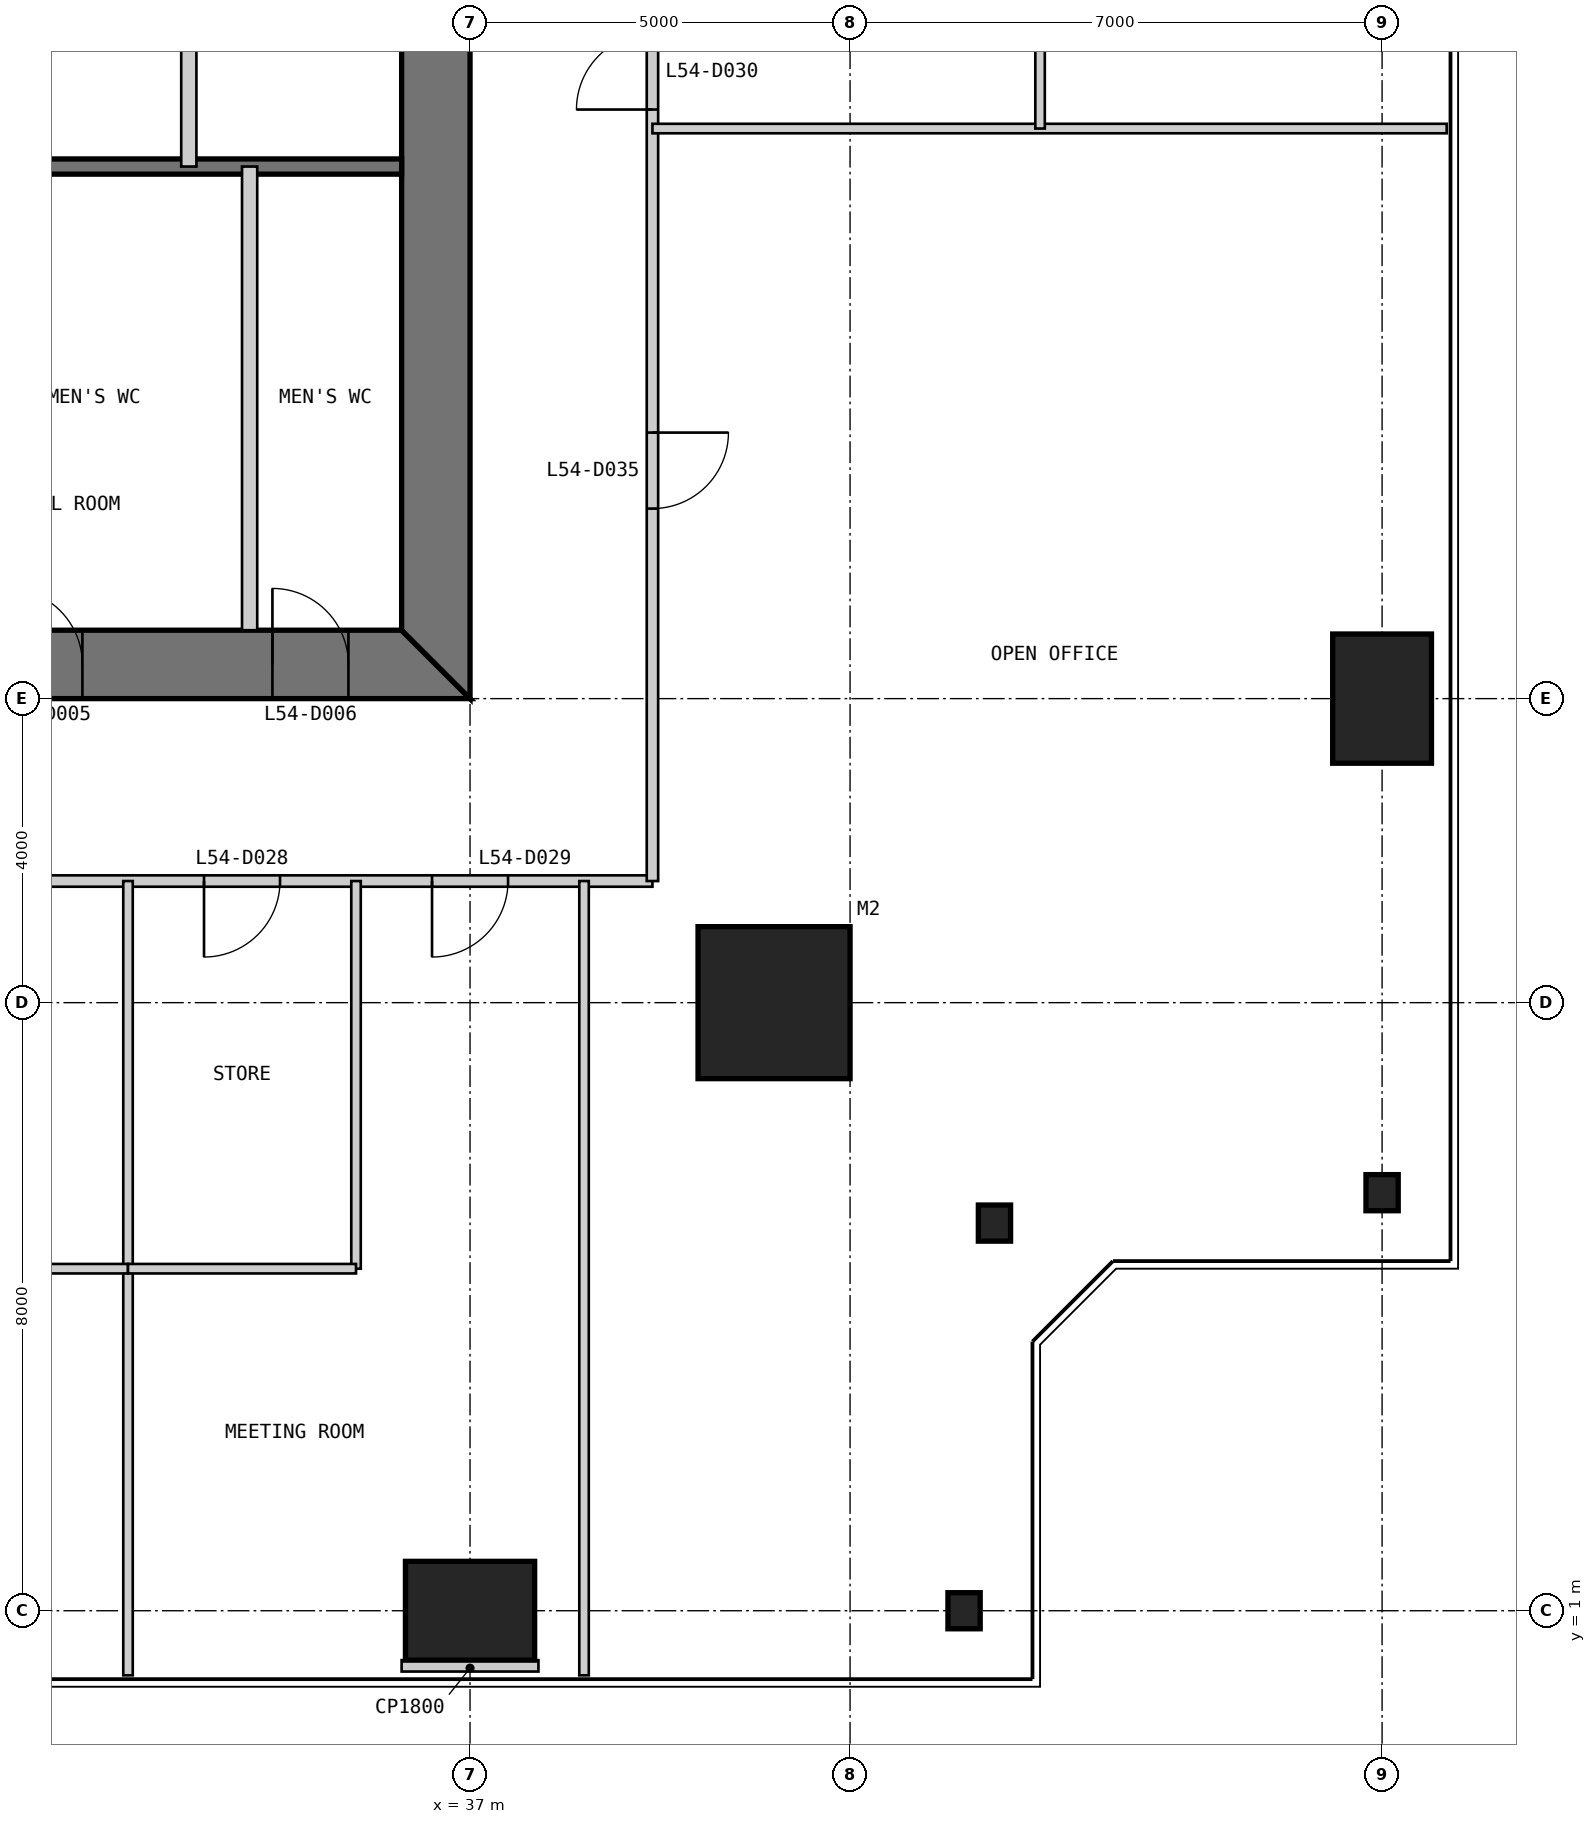
"""IFC4 building model, lengths in metres.
Left out: names, types, materials, properties, quantities, classifications, styles, units other than length and angle.
Written with IfcOpenShell. Run it as: python <this file> out.ifc"""

import sys

from ifc_helpers import new_model, si_unit, direction, frame, frame_2d, origin, origin_2d, place, context, subcontext, project, spatial, polyline, rectangle, i_section, outline, extrude, element, fill, save


model = new_model("IFC4")
c1 = context("Model", 3, precision=1e-05, world=origin(), true_north=direction((0.0, 1.0)))
c2 = subcontext(c1, "Body", "Model", "MODEL_VIEW")
j1 = project(units=[si_unit("LENGTHUNIT", "METRE"), si_unit("PLANEANGLEUNIT", "RADIAN")], contexts=[c1])
p1 = place(None, origin())
s1 = spatial("IfcSite", under=j1, at=p1, CompositionType="ELEMENT")
p2 = place(p1, origin())
s2 = spatial("IfcBuilding", under=s1, at=p2, CompositionType="ELEMENT")
p3 = place(p2, frame((0.0, 0.0, 229.8)))
s3 = spatial("IfcBuildingStorey", under=s2, at=p3, CompositionType="ELEMENT", Elevation=229.8)
p4 = place(p3, frame((41.0, 9.0, 0.0), z_axis=(0.0, 0.0, 1.0), x_axis=(1.0, 0.0, 0.0)))
e1 = element("IfcColumn", 1, at=p4, inside=s3, PredefinedType="COLUMN", context=c2, shape_type="SweptSolid", body=[
    extrude(rectangle(XDim=2.0, YDim=2.0, at=origin_2d()), origin(), (0.0, 0.0, 1.0), 4.0),
])
p5 = place(p3, frame((37.0, 1.0, 0.0), z_axis=(0.0, 0.0, 1.0), x_axis=(1.0, 0.0, 0.0)))
e2 = element("IfcColumn", 2, at=p5, inside=s3, PredefinedType="COLUMN", context=c2, shape_type="SweptSolid", body=[
    extrude(rectangle(XDim=1.7, YDim=1.3, at=origin_2d()), origin(), (0.0, 0.0, 1.0), 4.0),
])
for number, where, z_axis, x_axis in (
    (3, (43.5, 1.0, 0.0), (0.0, 0.0, 1.0), (1.0, 0.0, 0.0)),
    (4, (43.9, 6.1, 0.0), (0.0, 0.0, 1.0), (1.0, 0.0, 0.0)),
    (5, (49.0, 6.5, 0.0), (0.0, 0.0, 1.0), (1.0, 0.0, 0.0)),
):
    element("IfcColumn", number, at=place(p3, frame(where, z_axis=z_axis, x_axis=x_axis)), inside=s3, PredefinedType="COLUMN", context=c2, shape_type="SweptSolid", body=[
        extrude(i_section(OverallWidth=0.424, OverallDepth=0.475, WebThickness=0.048, FlangeThickness=0.077, at=origin_2d()), origin(), (0.0, 0.0, 1.0), 4.0),
    ])
p6 = place(p3, frame((49.0, 13.0, 0.0), z_axis=(0.0, 0.0, 1.0), x_axis=(1.0, 0.0, 0.0)))
e6 = element("IfcColumn", 6, at=p6, inside=s3, PredefinedType="COLUMN", context=c2, shape_type="SweptSolid", body=[
    extrude(rectangle(XDim=1.3, YDim=1.7, at=origin_2d()), origin(), (0.0, 0.0, 1.0), 4.0),
])
p7 = place(p3, frame((13.0, 13.45, 0.0), z_axis=(0.0, 0.0, 1.0), x_axis=(1.0, 0.0, 0.0)))
e7 = element("IfcWall", 7, at=p7, inside=s3, PredefinedType="SHEAR", context=c2, shape_type="SweptSolid", body=[
    extrude(outline(polyline([(0.0, -0.45), (24.0, -0.45), (23.1, 0.45), (0.9, 0.45), (0.0, -0.45)])), origin(), (0.0, 0.0, 1.0), 4.0),
])
p8 = place(p7, frame((4.9, 0.0, 0.0)))
e8 = element("IfcOpeningElement", 8, at=p8, cuts=e7, PredefinedType="OPENING", context=c2, shape_type="SweptSolid", body=[
    extrude(rectangle(XDim=1.0, YDim=2.2, at=frame_2d((0.5, 1.1))), frame((0.0, 0.46, 0.0), z_axis=(0.0, -1.0, 0.0), x_axis=(1.0, 0.0, 0.0)), (0.0, 0.0, 1.0), 0.92),
])
p9 = place(p7, frame((8.9, 0.0, 0.0)))
e9 = element("IfcOpeningElement", 9, at=p9, cuts=e7, PredefinedType="OPENING", context=c2, shape_type="SweptSolid", body=[
    extrude(rectangle(XDim=1.1, YDim=2.2, at=frame_2d((0.55, 1.1))), frame((0.0, 0.46, 0.0), z_axis=(0.0, -1.0, 0.0), x_axis=(1.0, 0.0, 0.0)), (0.0, 0.0, 1.0), 0.92),
])
p10 = place(p7, frame((15.05, 0.0, 0.0)))
e10 = element("IfcOpeningElement", 10, at=p10, cuts=e7, PredefinedType="OPENING", context=c2, shape_type="SweptSolid", body=[
    extrude(rectangle(XDim=0.9, YDim=2.2, at=frame_2d((0.45, 1.1))), frame((0.0, 0.46, 0.0), z_axis=(0.0, -1.0, 0.0), x_axis=(1.0, 0.0, 0.0)), (0.0, 0.0, 1.0), 0.92),
])
p11 = place(p7, frame((17.9, 0.0, 0.0)))
e11 = element("IfcOpeningElement", 11, at=p11, cuts=e7, PredefinedType="OPENING", context=c2, shape_type="SweptSolid", body=[
    extrude(rectangle(XDim=1.0, YDim=2.2, at=frame_2d((0.5, 1.1))), frame((0.0, 0.46, 0.0), z_axis=(0.0, -1.0, 0.0), x_axis=(1.0, 0.0, 0.0)), (0.0, 0.0, 1.0), 0.92),
])
p12 = place(p7, frame((21.4, 0.0, 0.0)))
e12 = element("IfcOpeningElement", 12, at=p12, cuts=e7, PredefinedType="OPENING", context=c2, shape_type="SweptSolid", body=[
    extrude(rectangle(XDim=1.0, YDim=2.2, at=frame_2d((0.5, 1.1))), frame((0.0, 0.46, 0.0), z_axis=(0.0, -1.0, 0.0), x_axis=(1.0, 0.0, 0.0)), (0.0, 0.0, 1.0), 0.92),
])
p13 = place(p3, frame((36.55, 13.9, 0.0), z_axis=(0.0, 0.0, 1.0), x_axis=(0.0, 1.0, 0.0)))
e13 = element("IfcWall", 13, at=p13, inside=s3, PredefinedType="SHEAR", context=c2, shape_type="SweptSolid", body=[
    extrude(outline(polyline([(-0.9, -0.45), (23.1, -0.45), (22.2, 0.45), (0.0, 0.45), (-0.9, -0.45)])), origin(), (0.0, 0.0, 1.0), 4.0),
])
p14 = place(p13, frame((20.2, 0.0, 0.0)))
e14 = element("IfcOpeningElement", 14, at=p14, cuts=e13, PredefinedType="OPENING", context=c2, shape_type="SweptSolid", body=[
    extrude(rectangle(XDim=1.0, YDim=2.2, at=frame_2d((0.5, 1.1))), frame((0.0, 0.46, 0.0), z_axis=(0.0, -1.0, 0.0), x_axis=(1.0, 0.0, 0.0)), (0.0, 0.0, 1.0), 0.92),
])
p15 = place(p13, frame((17.25, 0.0, 0.0)))
e15 = element("IfcOpeningElement", 15, at=p15, cuts=e13, PredefinedType="OPENING", context=c2, shape_type="SweptSolid", body=[
    extrude(rectangle(XDim=0.9, YDim=2.2, at=frame_2d((0.45, 1.1))), frame((0.0, 0.46, 0.0), z_axis=(0.0, -1.0, 0.0), x_axis=(1.0, 0.0, 0.0)), (0.0, 0.0, 1.0), 0.92),
])
p16 = place(p3, frame((20.3, 20.0, 0.0), z_axis=(0.0, 0.0, 1.0), x_axis=(1.0, 0.0, 0.0)))
e16 = element("IfcWall", 16, at=p16, inside=s3, PredefinedType="SOLIDWALL", context=c2, shape_type="SweptSolid", body=[
    extrude(rectangle(XDim=15.8, YDim=0.2, at=frame_2d((7.9, 0.0))), origin(), (0.0, 0.0, 1.0), 3.8),
])
p17 = place(p3, frame((34.1, 13.9, 0.0), z_axis=(0.0, 0.0, 1.0), x_axis=(0.0, 1.0, 0.0)))
e17 = element("IfcWall", 17, at=p17, inside=s3, PredefinedType="PARTITIONING", context=c2, shape_type="SweptSolid", body=[
    extrude(rectangle(XDim=6.1, YDim=0.2, at=frame_2d((3.05, 0.0))), origin(), (0.0, 0.0, 1.0), 3.8),
])
p18 = place(p3, frame((33.3, 36.1, 0.0), z_axis=(0.0, 0.0, 1.0), x_axis=(0.0, -1.0, 0.0)))
e18 = element("IfcWall", 18, at=p18, inside=s3, PredefinedType="PARTITIONING", context=c2, shape_type="SweptSolid", body=[
    extrude(rectangle(XDim=16.1, YDim=0.2, at=frame_2d((8.05, 0.0))), origin(), (0.0, 0.0, 1.0), 3.8),
])
p19 = place(p3, frame((10.6, 10.6, 0.0), z_axis=(0.0, 0.0, 1.0), x_axis=(1.0, 0.0, 0.0)))
e19 = element("IfcWall", 19, at=p19, inside=s3, PredefinedType="PARTITIONING", context=c2, shape_type="SweptSolid", body=[
    extrude(rectangle(XDim=28.8, YDim=0.15, at=frame_2d((14.4, 0.0))), origin(), (0.0, 0.0, 1.0), 3.8),
])
p20 = place(p19, frame((10.15, 0.0, 0.0)))
e20 = element("IfcOpeningElement", 20, at=p20, cuts=e19, PredefinedType="OPENING", context=c2, shape_type="SweptSolid", body=[
    extrude(rectangle(XDim=1.0, YDim=2.2, at=frame_2d((0.5, 1.1))), frame((0.0, 0.085, 0.0), z_axis=(0.0, -1.0, 0.0), x_axis=(1.0, 0.0, 0.0)), (0.0, 0.0, 1.0), 0.17),
])
p21 = place(p19, frame((17.65, 0.0, 0.0)))
e21 = element("IfcOpeningElement", 21, at=p21, cuts=e19, PredefinedType="OPENING", context=c2, shape_type="SweptSolid", body=[
    extrude(rectangle(XDim=1.0, YDim=2.2, at=frame_2d((0.5, 1.1))), frame((0.0, 0.085, 0.0), z_axis=(0.0, -1.0, 0.0), x_axis=(1.0, 0.0, 0.0)), (0.0, 0.0, 1.0), 0.17),
])
p22 = place(p19, frame((4.9, 0.0, 0.0)))
e22 = element("IfcOpeningElement", 22, at=p22, cuts=e19, PredefinedType="OPENING", context=c2, shape_type="SweptSolid", body=[
    extrude(rectangle(XDim=1.0, YDim=2.2, at=frame_2d((0.5, 1.1))), frame((0.0, 0.085, 0.0), z_axis=(0.0, -1.0, 0.0), x_axis=(1.0, 0.0, 0.0)), (0.0, 0.0, 1.0), 0.17),
])
p23 = place(p19, frame((22.9, 0.0, 0.0)))
e23 = element("IfcOpeningElement", 23, at=p23, cuts=e19, PredefinedType="OPENING", context=c2, shape_type="SweptSolid", body=[
    extrude(rectangle(XDim=1.0, YDim=2.2, at=frame_2d((0.5, 1.1))), frame((0.0, 0.085, 0.0), z_axis=(0.0, -1.0, 0.0), x_axis=(1.0, 0.0, 0.0)), (0.0, 0.0, 1.0), 0.17),
])
p24 = place(p19, frame((25.9, 0.0, 0.0)))
e24 = element("IfcOpeningElement", 24, at=p24, cuts=e19, PredefinedType="OPENING", context=c2, shape_type="SweptSolid", body=[
    extrude(rectangle(XDim=1.0, YDim=2.2, at=frame_2d((0.5, 1.1))), frame((0.0, 0.085, 0.0), z_axis=(0.0, -1.0, 0.0), x_axis=(1.0, 0.0, 0.0)), (0.0, 0.0, 1.0), 0.17),
])
p25 = place(p3, frame((32.5, 0.15, 0.0), z_axis=(0.0, 0.0, 1.0), x_axis=(0.0, 1.0, 0.0)))
e25 = element("IfcWall", 25, at=p25, inside=s3, PredefinedType="PARTITIONING", context=c2, shape_type="SweptSolid", body=[
    extrude(rectangle(XDim=10.45, YDim=0.125, at=frame_2d((5.225, 0.0))), origin(), (0.0, 0.0, 1.0), 3.8),
])
p26 = place(p3, frame((35.5, 5.5, 0.0), z_axis=(0.0, 0.0, 1.0), x_axis=(0.0, 1.0, 0.0)))
e26 = element("IfcWall", 26, at=p26, inside=s3, PredefinedType="PARTITIONING", context=c2, shape_type="SweptSolid", body=[
    extrude(rectangle(XDim=5.1, YDim=0.125, at=frame_2d((2.55, 0.0))), origin(), (0.0, 0.0, 1.0), 3.8),
])
p27 = place(p3, frame((20.5, 5.5, 0.0), z_axis=(0.0, 0.0, 1.0), x_axis=(1.0, 0.0, 0.0)))
e27 = element("IfcWall", 27, at=p27, inside=s3, PredefinedType="PARTITIONING", context=c2, shape_type="SweptSolid", body=[
    extrude(rectangle(XDim=12.0, YDim=0.125, at=frame_2d((6.0, 0.0))), origin(), (0.0, 0.0, 1.0), 3.8),
])
p28 = place(p27, frame((4.0, 0.0, 0.0)))
e28 = element("IfcOpeningElement", 28, at=p28, cuts=e27, PredefinedType="OPENING", context=c2, shape_type="SweptSolid", body=[
    extrude(rectangle(XDim=1.0, YDim=2.2, at=frame_2d((0.5, 1.1))), frame((0.0, 0.073, 0.0), z_axis=(0.0, -1.0, 0.0), x_axis=(1.0, 0.0, 0.0)), (0.0, 0.0, 1.0), 0.145),
])
p29 = place(p27, frame((7.0, 0.0, 0.0)))
e29 = element("IfcOpeningElement", 29, at=p29, cuts=e27, PredefinedType="OPENING", context=c2, shape_type="SweptSolid", body=[
    extrude(rectangle(XDim=1.0, YDim=2.2, at=frame_2d((0.5, 1.1))), frame((0.0, 0.073, 0.0), z_axis=(0.0, -1.0, 0.0), x_axis=(1.0, 0.0, 0.0)), (0.0, 0.0, 1.0), 0.145),
])
p30 = place(p3, frame((32.5, 5.5, 0.0), z_axis=(0.0, 0.0, 1.0), x_axis=(1.0, 0.0, 0.0)))
e30 = element("IfcWall", 30, at=p30, inside=s3, PredefinedType="PARTITIONING", context=c2, shape_type="SweptSolid", body=[
    extrude(rectangle(XDim=3.0, YDim=0.125, at=frame_2d((1.5, 0.0))), origin(), (0.0, 0.0, 1.0), 3.8),
])
p31 = place(p3, frame((39.4, 10.6, 0.0), z_axis=(0.0, 0.0, 1.0), x_axis=(0.0, 1.0, 0.0)))
e31 = element("IfcWall", 31, at=p31, inside=s3, PredefinedType="PARTITIONING", context=c2, shape_type="SweptSolid", body=[
    extrude(rectangle(XDim=28.8, YDim=0.15, at=frame_2d((14.4, 0.0))), origin(), (0.0, 0.0, 1.0), 3.8),
])
p32 = place(p31, frame((10.15, 0.0, 0.0)))
e32 = element("IfcOpeningElement", 32, at=p32, cuts=e31, PredefinedType="OPENING", context=c2, shape_type="SweptSolid", body=[
    extrude(rectangle(XDim=1.0, YDim=2.2, at=frame_2d((0.5, 1.1))), frame((0.0, 0.085, 0.0), z_axis=(0.0, -1.0, 0.0), x_axis=(1.0, 0.0, 0.0)), (0.0, 0.0, 1.0), 0.17),
])
p33 = place(p31, frame((17.65, 0.0, 0.0)))
e33 = element("IfcOpeningElement", 33, at=p33, cuts=e31, PredefinedType="OPENING", context=c2, shape_type="SweptSolid", body=[
    extrude(rectangle(XDim=1.0, YDim=2.2, at=frame_2d((0.5, 1.1))), frame((0.0, 0.085, 0.0), z_axis=(0.0, -1.0, 0.0), x_axis=(1.0, 0.0, 0.0)), (0.0, 0.0, 1.0), 0.17),
])
p34 = place(p31, frame((4.9, 0.0, 0.0)))
e34 = element("IfcOpeningElement", 34, at=p34, cuts=e31, PredefinedType="OPENING", context=c2, shape_type="SweptSolid", body=[
    extrude(rectangle(XDim=1.0, YDim=2.2, at=frame_2d((0.5, 1.1))), frame((0.0, 0.085, 0.0), z_axis=(0.0, -1.0, 0.0), x_axis=(1.0, 0.0, 0.0)), (0.0, 0.0, 1.0), 0.17),
])
p35 = place(p31, frame((22.9, 0.0, 0.0)))
e35 = element("IfcOpeningElement", 35, at=p35, cuts=e31, PredefinedType="OPENING", context=c2, shape_type="SweptSolid", body=[
    extrude(rectangle(XDim=1.0, YDim=2.2, at=frame_2d((0.5, 1.1))), frame((0.0, 0.085, 0.0), z_axis=(0.0, -1.0, 0.0), x_axis=(1.0, 0.0, 0.0)), (0.0, 0.0, 1.0), 0.17),
])
p36 = place(p31, frame((25.9, 0.0, 0.0)))
e36 = element("IfcOpeningElement", 36, at=p36, cuts=e31, PredefinedType="OPENING", context=c2, shape_type="SweptSolid", body=[
    extrude(rectangle(XDim=1.0, YDim=2.2, at=frame_2d((0.5, 1.1))), frame((0.0, 0.085, 0.0), z_axis=(0.0, -1.0, 0.0), x_axis=(1.0, 0.0, 0.0)), (0.0, 0.0, 1.0), 0.17),
])
for number, where, z_axis, x_axis in (
    (37, (38.5, 0.15, 0.0), (0.0, 0.0, 1.0), (0.0, 1.0, 0.0)),
    (38, (49.85, 20.5, 0.0), (0.0, 0.0, 1.0), (-1.0, 0.0, 0.0)),
):
    element("IfcWall", number, at=place(p3, frame(where, z_axis=z_axis, x_axis=x_axis)), inside=s3, PredefinedType="PARTITIONING", context=c2, shape_type="SweptSolid", body=[
        extrude(rectangle(XDim=10.45, YDim=0.125, at=frame_2d((5.225, 0.0))), origin(), (0.0, 0.0, 1.0), 3.8),
    ])
p37 = place(p3, frame((44.5, 20.5, 0.0), z_axis=(0.0, 0.0, 1.0), x_axis=(0.0, 1.0, 0.0)))
e39 = element("IfcWall", 39, at=p37, inside=s3, PredefinedType="PARTITIONING", context=c2, shape_type="SweptSolid", body=[
    extrude(rectangle(XDim=12.0, YDim=0.125, at=frame_2d((6.0, 0.0))), origin(), (0.0, 0.0, 1.0), 3.8),
])
p38 = place(p37, frame((4.0, 0.0, 0.0)))
e40 = element("IfcOpeningElement", 40, at=p38, cuts=e39, PredefinedType="OPENING", context=c2, shape_type="SweptSolid", body=[
    extrude(rectangle(XDim=1.0, YDim=2.2, at=frame_2d((0.5, 1.1))), frame((0.0, 0.073, 0.0), z_axis=(0.0, -1.0, 0.0), x_axis=(1.0, 0.0, 0.0)), (0.0, 0.0, 1.0), 0.145),
])
p39 = place(p37, frame((7.0, 0.0, 0.0)))
e41 = element("IfcOpeningElement", 41, at=p39, cuts=e39, PredefinedType="OPENING", context=c2, shape_type="SweptSolid", body=[
    extrude(rectangle(XDim=1.0, YDim=2.2, at=frame_2d((0.5, 1.1))), frame((0.0, 0.073, 0.0), z_axis=(0.0, -1.0, 0.0), x_axis=(1.0, 0.0, 0.0)), (0.0, 0.0, 1.0), 0.145),
])
p40 = place(p3, frame((37.0, 0.2, 0.0), z_axis=(0.0, 0.0, 1.0), x_axis=(0.0, 1.0, 0.0)))
e42 = element("IfcWall", 42, at=p40, inside=s3, PredefinedType="PARTITIONING", context=c2, shape_type="SweptSolid", body=[
    extrude(rectangle(XDim=0.15, YDim=1.8, at=frame_2d((0.075, 0.0))), origin(), (0.0, 0.0, 1.0), 3.8),
])
p41 = place(p11, origin())
e43 = element("IfcDoor", 43, at=p41, inside=s3, OperationType="SINGLE_SWING_LEFT", PredefinedType="DOOR", context=c2, shape_type="SweptSolid", body=[
    extrude(rectangle(XDim=1.0, YDim=2.2, at=frame_2d((0.5, 1.1))), frame((0.0, 0.025, 0.0), z_axis=(0.0, -1.0, 0.0), x_axis=(1.0, 0.0, 0.0)), (0.0, 0.0, 1.0), 0.05),
    extrude(outline(polyline([(0.0, 0.0), (0.04, 0.0), (0.04, 2.16), (0.96, 2.16), (0.96, 0.0), (1.0, 0.0), (1.0, 2.2), (0.0, 2.2), (0.0, 0.0)])), frame((0.0, 0.3, 0.0), z_axis=(0.0, -1.0, 0.0), x_axis=(1.0, 0.0, 0.0)), (0.0, 0.0, 1.0), 0.6),
])
fill(e11, e43)
p42 = place(p12, origin())
e44 = element("IfcDoor", 44, at=p42, inside=s3, OperationType="SINGLE_SWING_LEFT", PredefinedType="DOOR", context=c2, shape_type="SweptSolid", body=[
    extrude(rectangle(XDim=1.0, YDim=2.2, at=frame_2d((0.5, 1.1))), frame((0.0, 0.025, 0.0), z_axis=(0.0, -1.0, 0.0), x_axis=(1.0, 0.0, 0.0)), (0.0, 0.0, 1.0), 0.05),
    extrude(outline(polyline([(0.0, 0.0), (0.04, 0.0), (0.04, 2.16), (0.96, 2.16), (0.96, 0.0), (1.0, 0.0), (1.0, 2.2), (0.0, 2.2), (0.0, 0.0)])), frame((0.0, 0.3, 0.0), z_axis=(0.0, -1.0, 0.0), x_axis=(1.0, 0.0, 0.0)), (0.0, 0.0, 1.0), 0.6),
])
fill(e12, e44)
p43 = place(p23, frame((1.0, 0.0, 0.0), z_axis=(0.0, 0.0, 1.0), x_axis=(-1.0, 0.0, 0.0)))
e45 = element("IfcDoor", 45, at=p43, inside=s3, OperationType="SINGLE_SWING_RIGHT", PredefinedType="DOOR", context=c2, shape_type="SweptSolid", body=[
    extrude(rectangle(XDim=1.0, YDim=2.2, at=frame_2d((0.5, 1.1))), frame((0.0, 0.025, 0.0), z_axis=(0.0, -1.0, 0.0), x_axis=(1.0, 0.0, 0.0)), (0.0, 0.0, 1.0), 0.05),
])
fill(e23, e45)
p44 = place(p24, frame((1.0, 0.0, 0.0), z_axis=(0.0, 0.0, 1.0), x_axis=(-1.0, 0.0, 0.0)))
e46 = element("IfcDoor", 46, at=p44, inside=s3, OperationType="SINGLE_SWING_RIGHT", PredefinedType="DOOR", context=c2, shape_type="SweptSolid", body=[
    extrude(rectangle(XDim=1.0, YDim=2.2, at=frame_2d((0.5, 1.1))), frame((0.0, 0.025, 0.0), z_axis=(0.0, -1.0, 0.0), x_axis=(1.0, 0.0, 0.0)), (0.0, 0.0, 1.0), 0.05),
])
fill(e24, e46)
p45 = place(p32, origin())
e47 = element("IfcDoor", 47, at=p45, inside=s3, OperationType="SINGLE_SWING_LEFT", PredefinedType="DOOR", context=c2, shape_type="SweptSolid", body=[
    extrude(rectangle(XDim=1.0, YDim=2.2, at=frame_2d((0.5, 1.1))), frame((0.0, 0.025, 0.0), z_axis=(0.0, -1.0, 0.0), x_axis=(1.0, 0.0, 0.0)), (0.0, 0.0, 1.0), 0.05),
])
fill(e32, e47)
p46 = place(p34, frame((1.0, 0.0, 0.0), z_axis=(0.0, 0.0, 1.0), x_axis=(-1.0, 0.0, 0.0)))
e48 = element("IfcDoor", 48, at=p46, inside=s3, OperationType="SINGLE_SWING_LEFT", PredefinedType="DOOR", context=c2, shape_type="SweptSolid", body=[
    extrude(rectangle(XDim=1.0, YDim=2.2, at=frame_2d((0.5, 1.1))), frame((0.0, 0.025, 0.0), z_axis=(0.0, -1.0, 0.0), x_axis=(1.0, 0.0, 0.0)), (0.0, 0.0, 1.0), 0.05),
])
fill(e34, e48)
save(model, sys.argv[1])
